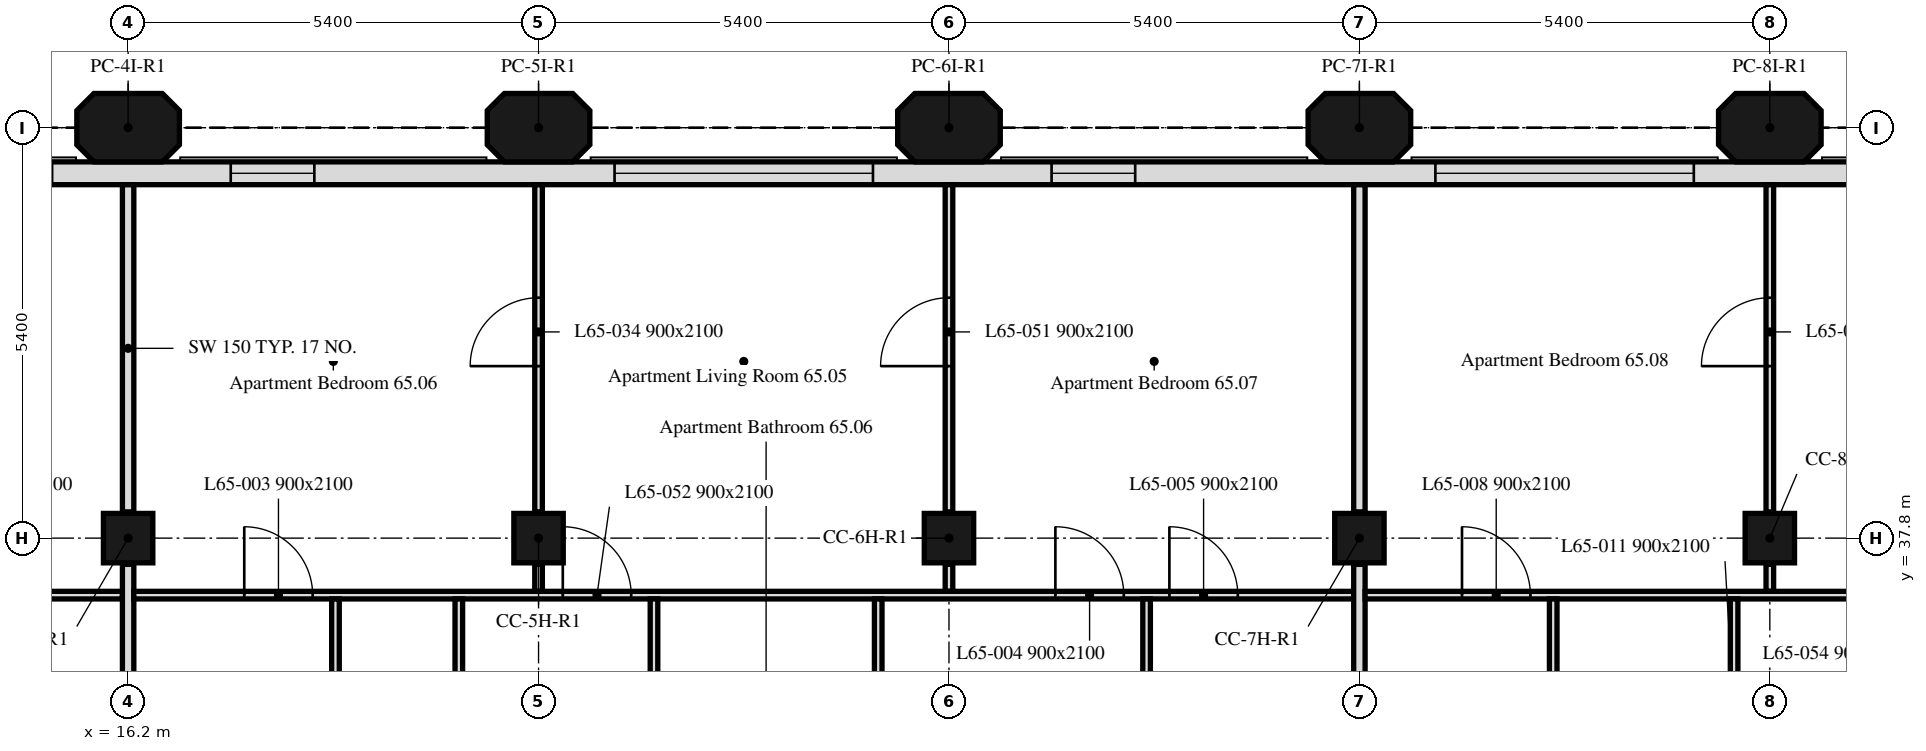
"""IFC4 building model, lengths in metres.
Left out: names, types, materials, properties, quantities, classifications, styles, units other than length and angle.
Written with IfcOpenShell. Run it as: python <this file> out.ifc"""

import sys

from ifc_helpers import new_model, si_unit, direction, frame, frame_2d, origin, origin_2d, place, context, subcontext, project, spatial, polyline, rectangle, outline, extrude, element, fill, save


model = new_model("IFC4")
c1 = context("Model", 3, precision=1e-05, world=origin(), true_north=direction((0.0, 1.0)))
c2 = subcontext(c1, "Body", "Model", "MODEL_VIEW")
j1 = project(units=[si_unit("LENGTHUNIT", "METRE"), si_unit("PLANEANGLEUNIT", "RADIAN")], contexts=[c1])
p1 = place(None, origin())
s1 = spatial("IfcSite", under=j1, at=p1, CompositionType="ELEMENT")
p2 = place(p1, origin())
s2 = spatial("IfcBuilding", under=s1, at=p2, CompositionType="ELEMENT")
p3 = place(p2, frame((0.0, 0.0, 268.6)))
s3 = spatial("IfcBuildingStorey", under=s2, at=p3, CompositionType="ELEMENT", Elevation=268.6)
for number, where, z_axis, x_axis in (
    (1, (16.2, 37.8, 0.0), (0.0, 0.0, 1.0), (1.0, 0.0, 0.0)),
    (2, (21.6, 37.8, 0.0), (0.0, 0.0, 1.0), (1.0, 0.0, 0.0)),
    (3, (27.0, 37.8, 0.0), (0.0, 0.0, 1.0), (1.0, 0.0, 0.0)),
    (4, (32.4, 37.8, 0.0), (0.0, 0.0, 1.0), (1.0, 0.0, 0.0)),
    (5, (37.8, 37.8, 0.0), (0.0, 0.0, 1.0), (1.0, 0.0, 0.0)),
):
    element("IfcColumn", number, at=place(p3, frame(where, z_axis=z_axis, x_axis=x_axis)), inside=s3, PredefinedType="COLUMN", context=c2, shape_type="SweptSolid", body=[
        extrude(rectangle(XDim=0.65, YDim=0.65, at=origin_2d()), origin(), (0.0, 0.0, 1.0), 3.0),
    ])
for number, where, z_axis, x_axis in (
    (6, (16.2, 43.2, 0.0), (0.0, 0.0, 1.0), (1.0, 0.0, 0.0)),
    (7, (21.6, 43.2, 0.0), (0.0, 0.0, 1.0), (1.0, 0.0, 0.0)),
    (8, (27.0, 43.2, 0.0), (0.0, 0.0, 1.0), (1.0, 0.0, 0.0)),
    (9, (32.4, 43.2, 0.0), (0.0, 0.0, 1.0), (1.0, 0.0, 0.0)),
    (10, (37.8, 43.2, 0.0), (0.0, 0.0, 1.0), (1.0, 0.0, 0.0)),
):
    element("IfcColumn", number, at=place(p3, frame(where, z_axis=z_axis, x_axis=x_axis)), inside=s3, PredefinedType="COLUMN", context=c2, shape_type="SweptSolid", body=[
        extrude(outline(polyline([(-0.45, -0.45), (0.45, -0.45), (0.675, -0.225), (0.675, 0.225), (0.45, 0.45), (-0.45, 0.45), (-0.675, 0.225), (-0.675, -0.225), (-0.45, -0.45)])), origin(), (0.0, 0.0, 1.0), 3.0),
    ])
p4 = place(p3, frame((43.014, 42.6, 0.0), z_axis=(0.0, 0.0, 1.0), x_axis=(-1.0, 0.0, 0.0)))
e11 = element("IfcWall", 11, at=p4, inside=s3, PredefinedType="SOLIDWALL", context=c2, shape_type="SweptSolid", body=[
    extrude(rectangle(XDim=32.027, YDim=0.3, at=frame_2d((16.014, 0.0))), origin(), (0.0, 0.0, 1.0), 3.0),
])
p5 = place(p4, frame((2.764, 0.0, 0.9)))
e12 = element("IfcOpeningElement", 12, at=p5, cuts=e11, PredefinedType="OPENING", context=c2, shape_type="SweptSolid", body=[
    extrude(rectangle(XDim=1.1, YDim=1.7, at=frame_2d((0.55, 0.85))), frame((0.0, 0.16, 0.0), z_axis=(0.0, -1.0, 0.0), x_axis=(1.0, 0.0, 0.0)), (0.0, 0.0, 1.0), 0.32),
])
p6 = place(p4, frame((6.214, 0.0, 0.9)))
e13 = element("IfcOpeningElement", 13, at=p6, cuts=e11, PredefinedType="OPENING", context=c2, shape_type="SweptSolid", body=[
    extrude(rectangle(XDim=3.4, YDim=1.7, at=frame_2d((1.7, 0.85))), frame((0.0, 0.16, 0.0), z_axis=(0.0, -1.0, 0.0), x_axis=(1.0, 0.0, 0.0)), (0.0, 0.0, 1.0), 0.32),
])
p7 = place(p4, frame((13.564, 0.0, 0.9)))
e14 = element("IfcOpeningElement", 14, at=p7, cuts=e11, PredefinedType="OPENING", context=c2, shape_type="SweptSolid", body=[
    extrude(rectangle(XDim=1.1, YDim=1.7, at=frame_2d((0.55, 0.85))), frame((0.0, 0.16, 0.0), z_axis=(0.0, -1.0, 0.0), x_axis=(1.0, 0.0, 0.0)), (0.0, 0.0, 1.0), 0.32),
])
p8 = place(p4, frame((17.014, 0.0, 0.9)))
e15 = element("IfcOpeningElement", 15, at=p8, cuts=e11, PredefinedType="OPENING", context=c2, shape_type="SweptSolid", body=[
    extrude(rectangle(XDim=3.4, YDim=1.7, at=frame_2d((1.7, 0.85))), frame((0.0, 0.16, 0.0), z_axis=(0.0, -1.0, 0.0), x_axis=(1.0, 0.0, 0.0)), (0.0, 0.0, 1.0), 0.32),
])
p9 = place(p4, frame((24.364, 0.0, 0.9)))
e16 = element("IfcOpeningElement", 16, at=p9, cuts=e11, PredefinedType="OPENING", context=c2, shape_type="SweptSolid", body=[
    extrude(rectangle(XDim=1.1, YDim=1.7, at=frame_2d((0.55, 0.85))), frame((0.0, 0.16, 0.0), z_axis=(0.0, -1.0, 0.0), x_axis=(1.0, 0.0, 0.0)), (0.0, 0.0, 1.0), 0.32),
])
p10 = place(p4, frame((27.814, 0.0, 0.9)))
e17 = element("IfcOpeningElement", 17, at=p10, cuts=e11, PredefinedType="OPENING", context=c2, shape_type="SweptSolid", body=[
    extrude(rectangle(XDim=3.4, YDim=1.7, at=frame_2d((1.7, 0.85))), frame((0.0, 0.16, 0.0), z_axis=(0.0, -1.0, 0.0), x_axis=(1.0, 0.0, 0.0)), (0.0, 0.0, 1.0), 0.32),
])
p11 = place(p3, frame((10.89, 37.05, 0.0), z_axis=(0.0, 0.0, 1.0), x_axis=(1.0, 0.0, 0.0)))
e18 = element("IfcWall", 18, at=p11, inside=s3, PredefinedType="PARTITIONING", context=c2, shape_type="SweptSolid", body=[
    extrude(rectangle(XDim=5.235, YDim=0.1, at=frame_2d((2.618, 0.0))), origin(), (0.0, 0.0, 1.0), 3.0),
])
p12 = place(p11, frame((3.15, 0.0, 0.0)))
e19 = element("IfcOpeningElement", 19, at=p12, cuts=e18, PredefinedType="OPENING", context=c2, shape_type="SweptSolid", body=[
    extrude(rectangle(XDim=0.9, YDim=2.1, at=frame_2d((0.45, 1.05))), frame((0.0, 0.05, 0.0), z_axis=(0.0, -1.0, 0.0), x_axis=(1.0, 0.0, 0.0)), (0.0, 0.0, 1.0), 0.1),
])
p13 = place(p3, frame((16.2, 38.145, 0.0), z_axis=(0.0, 0.0, 1.0), x_axis=(0.0, 1.0, 0.0)))
e20 = element("IfcWall", 20, at=p13, inside=s3, PredefinedType="PARTITIONING", context=c2, shape_type="SweptSolid", body=[
    extrude(rectangle(XDim=4.304, YDim=0.15, at=frame_2d((2.152, 0.0))), origin(), (0.0, 0.0, 1.0), 3.0),
])
p14 = place(p3, frame((16.2, 34.725, 0.0), z_axis=(0.0, 0.0, 1.0), x_axis=(0.0, 1.0, 0.0)))
e21 = element("IfcWall", 21, at=p14, inside=s3, PredefinedType="PARTITIONING", context=c2, shape_type="SweptSolid", body=[
    extrude(rectangle(XDim=2.73, YDim=0.15, at=frame_2d((1.365, 0.0))), origin(), (0.0, 0.0, 1.0), 3.0),
])
p15 = place(p3, frame((21.6, 37.1, 0.0), z_axis=(0.0, 0.0, 1.0), x_axis=(0.0, 1.0, 0.0)))
e22 = element("IfcWall", 22, at=p15, inside=s3, PredefinedType="PARTITIONING", context=c2, shape_type="SweptSolid", body=[
    extrude(rectangle(XDim=0.355, YDim=0.1, at=frame_2d((0.177, 0.0))), origin(), (0.0, 0.0, 1.0), 3.0),
])
p16 = place(p3, frame((21.6, 38.145, 0.0), z_axis=(0.0, 0.0, 1.0), x_axis=(0.0, 1.0, 0.0)))
e23 = element("IfcWall", 23, at=p16, inside=s3, PredefinedType="PARTITIONING", context=c2, shape_type="SweptSolid", body=[
    extrude(rectangle(XDim=4.304, YDim=0.1, at=frame_2d((2.152, 0.0))), origin(), (0.0, 0.0, 1.0), 3.0),
])
p17 = place(p16, frame((1.918, 0.0, 0.0)))
e24 = element("IfcOpeningElement", 24, at=p17, cuts=e23, PredefinedType="OPENING", context=c2, shape_type="SweptSolid", body=[
    extrude(rectangle(XDim=0.9, YDim=2.1, at=frame_2d((0.45, 1.05))), frame((0.0, 0.05, 0.0), z_axis=(0.0, -1.0, 0.0), x_axis=(1.0, 0.0, 0.0)), (0.0, 0.0, 1.0), 0.1),
])
p18 = place(p3, frame((27.0, 37.1, 0.0), z_axis=(0.0, 0.0, 1.0), x_axis=(0.0, 1.0, 0.0)))
e25 = element("IfcWall", 25, at=p18, inside=s3, PredefinedType="PARTITIONING", context=c2, shape_type="SweptSolid", body=[
    extrude(rectangle(XDim=0.355, YDim=0.1, at=frame_2d((0.177, 0.0))), origin(), (0.0, 0.0, 1.0), 3.0),
])
p19 = place(p3, frame((27.0, 38.145, 0.0), z_axis=(0.0, 0.0, 1.0), x_axis=(0.0, 1.0, 0.0)))
e26 = element("IfcWall", 26, at=p19, inside=s3, PredefinedType="PARTITIONING", context=c2, shape_type="SweptSolid", body=[
    extrude(rectangle(XDim=4.304, YDim=0.1, at=frame_2d((2.152, 0.0))), origin(), (0.0, 0.0, 1.0), 3.0),
])
p20 = place(p19, frame((1.918, 0.0, 0.0)))
e27 = element("IfcOpeningElement", 27, at=p20, cuts=e26, PredefinedType="OPENING", context=c2, shape_type="SweptSolid", body=[
    extrude(rectangle(XDim=0.9, YDim=2.1, at=frame_2d((0.45, 1.05))), frame((0.0, 0.05, 0.0), z_axis=(0.0, -1.0, 0.0), x_axis=(1.0, 0.0, 0.0)), (0.0, 0.0, 1.0), 0.1),
])
p21 = place(p3, frame((16.275, 37.05, 0.0), z_axis=(0.0, 0.0, 1.0), x_axis=(1.0, 0.0, 0.0)))
e28 = element("IfcWall", 28, at=p21, inside=s3, PredefinedType="PARTITIONING", context=c2, shape_type="SweptSolid", body=[
    extrude(rectangle(XDim=16.05, YDim=0.1, at=frame_2d((8.025, 0.0))), origin(), (0.0, 0.0, 1.0), 3.0),
])
p22 = place(p21, frame((1.453, 0.0, 0.0)))
e29 = element("IfcOpeningElement", 29, at=p22, cuts=e28, PredefinedType="OPENING", context=c2, shape_type="SweptSolid", body=[
    extrude(rectangle(XDim=0.9, YDim=2.1, at=frame_2d((0.45, 1.05))), frame((0.0, 0.05, 0.0), z_axis=(0.0, -1.0, 0.0), x_axis=(1.0, 0.0, 0.0)), (0.0, 0.0, 1.0), 0.1),
])
p23 = place(p21, frame((12.125, 0.0, 0.0)))
e30 = element("IfcOpeningElement", 30, at=p23, cuts=e28, PredefinedType="OPENING", context=c2, shape_type="SweptSolid", body=[
    extrude(rectangle(XDim=0.9, YDim=2.1, at=frame_2d((0.45, 1.05))), frame((0.0, 0.05, 0.0), z_axis=(0.0, -1.0, 0.0), x_axis=(1.0, 0.0, 0.0)), (0.0, 0.0, 1.0), 0.1),
])
p24 = place(p21, frame((13.625, 0.0, 0.0)))
e31 = element("IfcOpeningElement", 31, at=p24, cuts=e28, PredefinedType="OPENING", context=c2, shape_type="SweptSolid", body=[
    extrude(rectangle(XDim=0.9, YDim=2.1, at=frame_2d((0.45, 1.05))), frame((0.0, 0.05, 0.0), z_axis=(0.0, -1.0, 0.0), x_axis=(1.0, 0.0, 0.0)), (0.0, 0.0, 1.0), 0.1),
])
p25 = place(p21, frame((5.644, 0.0, 0.0)))
e32 = element("IfcOpeningElement", 32, at=p25, cuts=e28, PredefinedType="OPENING", context=c2, shape_type="SweptSolid", body=[
    extrude(rectangle(XDim=0.9, YDim=2.1, at=frame_2d((0.45, 1.05))), frame((0.0, 0.05, 0.0), z_axis=(0.0, -1.0, 0.0), x_axis=(1.0, 0.0, 0.0)), (0.0, 0.0, 1.0), 0.1),
])
p26 = place(p3, frame((32.4, 38.145, 0.0), z_axis=(0.0, 0.0, 1.0), x_axis=(0.0, 1.0, 0.0)))
e33 = element("IfcWall", 33, at=p26, inside=s3, PredefinedType="PARTITIONING", context=c2, shape_type="SweptSolid", body=[
    extrude(rectangle(XDim=4.304, YDim=0.15, at=frame_2d((2.152, 0.0))), origin(), (0.0, 0.0, 1.0), 3.0),
])
p27 = place(p3, frame((18.928, 34.725, 0.0), z_axis=(0.0, 0.0, 1.0), x_axis=(0.0, 1.0, 0.0)))
e34 = element("IfcWall", 34, at=p27, inside=s3, PredefinedType="PARTITIONING", context=c2, shape_type="SweptSolid", body=[
    extrude(rectangle(XDim=2.275, YDim=0.1, at=frame_2d((1.137, 0.0))), origin(), (0.0, 0.0, 1.0), 3.0),
])
p28 = place(p3, frame((20.551, 34.725, 0.0), z_axis=(0.0, 0.0, 1.0), x_axis=(0.0, 1.0, 0.0)))
e35 = element("IfcWall", 35, at=p28, inside=s3, PredefinedType="PARTITIONING", context=c2, shape_type="SweptSolid", body=[
    extrude(rectangle(XDim=2.275, YDim=0.1, at=frame_2d((1.137, 0.0))), origin(), (0.0, 0.0, 1.0), 3.0),
])
p29 = place(p28, frame((0.25, 0.0, 0.0)))
e36 = element("IfcOpeningElement", 36, at=p29, cuts=e35, PredefinedType="OPENING", context=c2, shape_type="SweptSolid", body=[
    extrude(rectangle(XDim=0.9, YDim=2.1, at=frame_2d((0.45, 1.05))), frame((0.0, 0.05, 0.0), z_axis=(0.0, -1.0, 0.0), x_axis=(1.0, 0.0, 0.0)), (0.0, 0.0, 1.0), 0.1),
])
p30 = place(p3, frame((23.119, 34.725, 0.0), z_axis=(0.0, 0.0, 1.0), x_axis=(0.0, 1.0, 0.0)))
e37 = element("IfcWall", 37, at=p30, inside=s3, PredefinedType="PARTITIONING", context=c2, shape_type="SweptSolid", body=[
    extrude(rectangle(XDim=2.275, YDim=0.1, at=frame_2d((1.137, 0.0))), origin(), (0.0, 0.0, 1.0), 3.0),
])
p31 = place(p30, frame((0.25, 0.0, 0.0)))
e38 = element("IfcOpeningElement", 38, at=p31, cuts=e37, PredefinedType="OPENING", context=c2, shape_type="SweptSolid", body=[
    extrude(rectangle(XDim=0.9, YDim=2.1, at=frame_2d((0.45, 1.05))), frame((0.0, 0.05, 0.0), z_axis=(0.0, -1.0, 0.0), x_axis=(1.0, 0.0, 0.0)), (0.0, 0.0, 1.0), 0.1),
])
for number, where, z_axis, x_axis in (
    (39, (26.069, 34.725, 0.0), (0.0, 0.0, 1.0), (0.0, 1.0, 0.0)),
    (40, (29.6, 34.725, 0.0), (0.0, 0.0, 1.0), (0.0, 1.0, 0.0)),
):
    element("IfcWall", number, at=place(p3, frame(where, z_axis=z_axis, x_axis=x_axis)), inside=s3, PredefinedType="PARTITIONING", context=c2, shape_type="SweptSolid", body=[
        extrude(rectangle(XDim=2.275, YDim=0.1, at=frame_2d((1.137, 0.0))), origin(), (0.0, 0.0, 1.0), 3.0),
    ])
p32 = place(p3, frame((32.4, 34.725, 0.0), z_axis=(0.0, 0.0, 1.0), x_axis=(0.0, 1.0, 0.0)))
e41 = element("IfcWall", 41, at=p32, inside=s3, PredefinedType="PARTITIONING", context=c2, shape_type="SweptSolid", body=[
    extrude(rectangle(XDim=2.73, YDim=0.15, at=frame_2d((1.365, 0.0))), origin(), (0.0, 0.0, 1.0), 3.0),
])
p33 = place(p3, frame((37.8, 37.1, 0.0), z_axis=(0.0, 0.0, 1.0), x_axis=(0.0, 1.0, 0.0)))
e42 = element("IfcWall", 42, at=p33, inside=s3, PredefinedType="PARTITIONING", context=c2, shape_type="SweptSolid", body=[
    extrude(rectangle(XDim=0.355, YDim=0.1, at=frame_2d((0.177, 0.0))), origin(), (0.0, 0.0, 1.0), 3.0),
])
p34 = place(p3, frame((37.8, 38.145, 0.0), z_axis=(0.0, 0.0, 1.0), x_axis=(0.0, 1.0, 0.0)))
e43 = element("IfcWall", 43, at=p34, inside=s3, PredefinedType="PARTITIONING", context=c2, shape_type="SweptSolid", body=[
    extrude(rectangle(XDim=4.304, YDim=0.1, at=frame_2d((2.152, 0.0))), origin(), (0.0, 0.0, 1.0), 3.0),
])
p35 = place(p34, frame((1.918, 0.0, 0.0)))
e44 = element("IfcOpeningElement", 44, at=p35, cuts=e43, PredefinedType="OPENING", context=c2, shape_type="SweptSolid", body=[
    extrude(rectangle(XDim=0.9, YDim=2.1, at=frame_2d((0.45, 1.05))), frame((0.0, 0.05, 0.0), z_axis=(0.0, -1.0, 0.0), x_axis=(1.0, 0.0, 0.0)), (0.0, 0.0, 1.0), 0.1),
])
p36 = place(p3, frame((32.475, 37.05, 0.0), z_axis=(0.0, 0.0, 1.0), x_axis=(1.0, 0.0, 0.0)))
e45 = element("IfcWall", 45, at=p36, inside=s3, PredefinedType="PARTITIONING", context=c2, shape_type="SweptSolid", body=[
    extrude(rectangle(XDim=10.485, YDim=0.1, at=frame_2d((5.242, 0.0))), origin(), (0.0, 0.0, 1.0), 3.0),
])
p37 = place(p36, frame((1.275, 0.0, 0.0)))
e46 = element("IfcOpeningElement", 46, at=p37, cuts=e45, PredefinedType="OPENING", context=c2, shape_type="SweptSolid", body=[
    extrude(rectangle(XDim=0.9, YDim=2.1, at=frame_2d((0.45, 1.05))), frame((0.0, 0.05, 0.0), z_axis=(0.0, -1.0, 0.0), x_axis=(1.0, 0.0, 0.0)), (0.0, 0.0, 1.0), 0.1),
])
p38 = place(p36, frame((6.535, 0.0, 0.0)))
e47 = element("IfcOpeningElement", 47, at=p38, cuts=e45, PredefinedType="OPENING", context=c2, shape_type="SweptSolid", body=[
    extrude(rectangle(XDim=0.9, YDim=2.1, at=frame_2d((0.45, 1.05))), frame((0.0, 0.05, 0.0), z_axis=(0.0, -1.0, 0.0), x_axis=(1.0, 0.0, 0.0)), (0.0, 0.0, 1.0), 0.1),
])
p39 = place(p3, frame((34.95, 34.725, 0.0), z_axis=(0.0, 0.0, 1.0), x_axis=(0.0, 1.0, 0.0)))
e48 = element("IfcWall", 48, at=p39, inside=s3, PredefinedType="PARTITIONING", context=c2, shape_type="SweptSolid", body=[
    extrude(rectangle(XDim=2.275, YDim=0.1, at=frame_2d((1.137, 0.0))), origin(), (0.0, 0.0, 1.0), 3.0),
])
p40 = place(p3, frame((37.33, 34.725, 0.0), z_axis=(0.0, 0.0, 1.0), x_axis=(0.0, 1.0, 0.0)))
e49 = element("IfcWall", 49, at=p40, inside=s3, PredefinedType="PARTITIONING", context=c2, shape_type="SweptSolid", body=[
    extrude(rectangle(XDim=2.275, YDim=0.1, at=frame_2d((1.137, 0.0))), origin(), (0.0, 0.0, 1.0), 3.0),
])
p41 = place(p40, frame((0.25, 0.0, 0.0)))
e50 = element("IfcOpeningElement", 50, at=p41, cuts=e49, PredefinedType="OPENING", context=c2, shape_type="SweptSolid", body=[
    extrude(rectangle(XDim=0.9, YDim=2.1, at=frame_2d((0.45, 1.05))), frame((0.0, 0.05, 0.0), z_axis=(0.0, -1.0, 0.0), x_axis=(1.0, 0.0, 0.0)), (0.0, 0.0, 1.0), 0.1),
])
p42 = place(p6, origin())
e51 = element("IfcWindow", 51, at=p42, inside=s3, PartitioningType="SINGLE_PANEL", PredefinedType="WINDOW", context=c2, shape_type="SweptSolid", body=[
    extrude(rectangle(XDim=3.4, YDim=1.7, at=frame_2d((1.7, 0.85))), frame((0.0, 0.03, 0.0), z_axis=(0.0, -1.0, 0.0), x_axis=(1.0, 0.0, 0.0)), (0.0, 0.0, 1.0), 0.06),
])
fill(e13, e51)
p43 = place(p7, origin())
e52 = element("IfcWindow", 52, at=p43, inside=s3, PartitioningType="SINGLE_PANEL", PredefinedType="WINDOW", context=c2, shape_type="SweptSolid", body=[
    extrude(rectangle(XDim=1.1, YDim=1.7, at=frame_2d((0.55, 0.85))), frame((0.0, 0.03, 0.0), z_axis=(0.0, -1.0, 0.0), x_axis=(1.0, 0.0, 0.0)), (0.0, 0.0, 1.0), 0.06),
])
fill(e14, e52)
p44 = place(p8, origin())
e53 = element("IfcWindow", 53, at=p44, inside=s3, PartitioningType="SINGLE_PANEL", PredefinedType="WINDOW", context=c2, shape_type="SweptSolid", body=[
    extrude(rectangle(XDim=3.4, YDim=1.7, at=frame_2d((1.7, 0.85))), frame((0.0, 0.03, 0.0), z_axis=(0.0, -1.0, 0.0), x_axis=(1.0, 0.0, 0.0)), (0.0, 0.0, 1.0), 0.06),
])
fill(e15, e53)
p45 = place(p9, origin())
e54 = element("IfcWindow", 54, at=p45, inside=s3, PartitioningType="SINGLE_PANEL", PredefinedType="WINDOW", context=c2, shape_type="SweptSolid", body=[
    extrude(rectangle(XDim=1.1, YDim=1.7, at=frame_2d((0.55, 0.85))), frame((0.0, 0.03, 0.0), z_axis=(0.0, -1.0, 0.0), x_axis=(1.0, 0.0, 0.0)), (0.0, 0.0, 1.0), 0.06),
])
fill(e16, e54)
p46 = place(p22, origin())
e55 = element("IfcDoor", 55, at=p46, inside=s3, OperationType="SINGLE_SWING_LEFT", PredefinedType="DOOR", context=c2, shape_type="SweptSolid", body=[
    extrude(rectangle(XDim=0.9, YDim=2.1, at=frame_2d((0.45, 1.05))), frame((0.0, 0.025, 0.0), z_axis=(0.0, -1.0, 0.0), x_axis=(1.0, 0.0, 0.0)), (0.0, 0.0, 1.0), 0.05),
])
fill(e29, e55)
p47 = place(p23, origin())
e56 = element("IfcDoor", 56, at=p47, inside=s3, OperationType="SINGLE_SWING_RIGHT", PredefinedType="DOOR", context=c2, shape_type="SweptSolid", body=[
    extrude(rectangle(XDim=0.9, YDim=2.1, at=frame_2d((0.45, 1.05))), frame((0.0, 0.025, 0.0), z_axis=(0.0, -1.0, 0.0), x_axis=(1.0, 0.0, 0.0)), (0.0, 0.0, 1.0), 0.05),
])
fill(e30, e56)
p48 = place(p24, origin())
e57 = element("IfcDoor", 57, at=p48, inside=s3, OperationType="SINGLE_SWING_LEFT", PredefinedType="DOOR", context=c2, shape_type="SweptSolid", body=[
    extrude(rectangle(XDim=0.9, YDim=2.1, at=frame_2d((0.45, 1.05))), frame((0.0, 0.025, 0.0), z_axis=(0.0, -1.0, 0.0), x_axis=(1.0, 0.0, 0.0)), (0.0, 0.0, 1.0), 0.05),
])
fill(e31, e57)
p49 = place(p37, origin())
e58 = element("IfcDoor", 58, at=p49, inside=s3, OperationType="SINGLE_SWING_LEFT", PredefinedType="DOOR", context=c2, shape_type="SweptSolid", body=[
    extrude(rectangle(XDim=0.9, YDim=2.1, at=frame_2d((0.45, 1.05))), frame((0.0, 0.025, 0.0), z_axis=(0.0, -1.0, 0.0), x_axis=(1.0, 0.0, 0.0)), (0.0, 0.0, 1.0), 0.05),
])
fill(e46, e58)
p50 = place(p17, origin())
e59 = element("IfcDoor", 59, at=p50, inside=s3, OperationType="SINGLE_SWING_RIGHT", PredefinedType="DOOR", context=c2, shape_type="SweptSolid", body=[
    extrude(rectangle(XDim=0.9, YDim=2.1, at=frame_2d((0.45, 1.05))), frame((0.0, 0.025, 0.0), z_axis=(0.0, -1.0, 0.0), x_axis=(1.0, 0.0, 0.0)), (0.0, 0.0, 1.0), 0.05),
])
fill(e24, e59)
p51 = place(p35, origin())
e60 = element("IfcDoor", 60, at=p51, inside=s3, OperationType="SINGLE_SWING_LEFT", PredefinedType="DOOR", context=c2, shape_type="SweptSolid", body=[
    extrude(rectangle(XDim=0.9, YDim=2.1, at=frame_2d((0.45, 1.05))), frame((0.0, 0.025, 0.0), z_axis=(0.0, -1.0, 0.0), x_axis=(1.0, 0.0, 0.0)), (0.0, 0.0, 1.0), 0.05),
])
fill(e44, e60)
p52 = place(p20, origin())
e61 = element("IfcDoor", 61, at=p52, inside=s3, OperationType="SINGLE_SWING_LEFT", PredefinedType="DOOR", context=c2, shape_type="SweptSolid", body=[
    extrude(rectangle(XDim=0.9, YDim=2.1, at=frame_2d((0.45, 1.05))), frame((0.0, 0.025, 0.0), z_axis=(0.0, -1.0, 0.0), x_axis=(1.0, 0.0, 0.0)), (0.0, 0.0, 1.0), 0.05),
])
fill(e27, e61)
p53 = place(p25, origin())
e62 = element("IfcDoor", 62, at=p53, inside=s3, OperationType="SINGLE_SWING_RIGHT", PredefinedType="DOOR", context=c2, shape_type="SweptSolid", body=[
    extrude(rectangle(XDim=0.9, YDim=2.1, at=frame_2d((0.45, 1.05))), frame((0.0, 0.025, 0.0), z_axis=(0.0, -1.0, 0.0), x_axis=(1.0, 0.0, 0.0)), (0.0, 0.0, 1.0), 0.05),
])
fill(e32, e62)
save(model, sys.argv[1])
